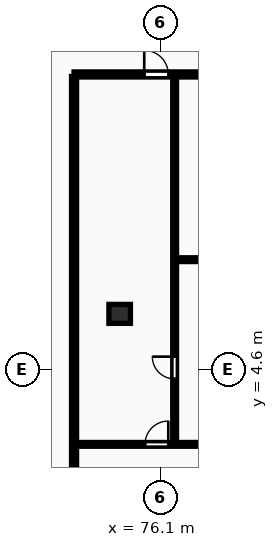
"""IFC4 building model, lengths in metres.
Left out: names, types, materials, properties, quantities, classifications, styles, units other than length and angle.
Written with IfcOpenShell. Run it as: python <this file> out.ifc"""

import sys

from ifc_helpers import new_model, si_unit, direction, frame, frame_2d, origin, origin_2d, place, context, subcontext, project, spatial, rectangle, extrude, element, fill, save


model = new_model("IFC4")
c1 = context("Model", 3, precision=1e-05, world=origin(), true_north=direction((0.0, 1.0)))
c2 = subcontext(c1, "Body", "Model", "MODEL_VIEW")
j1 = project(units=[si_unit("LENGTHUNIT", "METRE"), si_unit("PLANEANGLEUNIT", "RADIAN")], contexts=[c1])
p1 = place(None, origin())
s1 = spatial("IfcSite", under=j1, at=p1, CompositionType="ELEMENT")
p2 = place(p1, origin())
s2 = spatial("IfcBuilding", under=s1, at=p2, CompositionType="ELEMENT")
p3 = place(p2, frame((0.0, 0.0, 80.8)))
s3 = spatial("IfcBuildingStorey", under=s2, at=p3, CompositionType="ELEMENT", Elevation=80.8)
p4 = place(p3, frame((74.5, 6.8, 0.0), z_axis=(0.0, 0.0, 1.0), x_axis=(1.0, 0.0, 0.0)))
e1 = element("IfcColumn", 1, at=p4, inside=s3, PredefinedType="COLUMN", context=c2, shape_type="SweptSolid", body=[
    extrude(rectangle(XDim=0.85, YDim=0.75, at=origin_2d()), origin(), (0.0, 0.0, 1.0), 3.25),
])
p5 = place(p3, frame((72.7, -8.7, 0.0), z_axis=(0.0, 0.0, 1.0), x_axis=(0.0, 1.0, 0.0)))
e2 = element("IfcWall", 2, at=p5, inside=s3, PredefinedType="PARTITIONING", context=c2, shape_type="SweptSolid", body=[
    extrude(rectangle(XDim=24.87, YDim=0.2, at=frame_2d((12.435, 0.0))), origin(), (0.0, 0.0, 1.0), 2.97),
])
p6 = place(p3, frame((76.73, 8.94, 0.0), z_axis=(0.0, 0.0, 1.0), x_axis=(1.0, 0.0, 0.0)))
e3 = element("IfcWall", 3, at=p6, inside=s3, PredefinedType="PARTITIONING", context=c2, shape_type="SweptSolid", body=[
    extrude(rectangle(XDim=9.29, YDim=0.15, at=frame_2d((4.645, 0.0))), origin(), (0.0, 0.0, 1.0), 2.97),
])
p7 = place(p6, frame((2.854, 0.0, 0.0)))
e4 = element("IfcOpeningElement", 4, at=p7, cuts=e3, PredefinedType="OPENING", context=c2, shape_type="SweptSolid", body=[
    extrude(rectangle(XDim=0.88, YDim=2.06, at=frame_2d((0.44, 1.03))), frame((0.0, 0.085, 0.0), z_axis=(0.0, -1.0, 0.0), x_axis=(1.0, 0.0, 0.0)), (0.0, 0.0, 1.0), 0.17),
])
p8 = place(p3, frame((76.67, 1.69, 0.0), z_axis=(0.0, 0.0, 1.0), x_axis=(0.0, 1.0, 0.0)))
e5 = element("IfcWall", 5, at=p8, inside=s3, PredefinedType="PARTITIONING", context=c2, shape_type="SweptSolid", body=[
    extrude(rectangle(XDim=14.5, YDim=0.15, at=frame_2d((7.25, 0.0))), origin(), (0.0, 0.0, 1.0), 2.97),
])
p9 = place(p8, frame((2.542, 0.0, 0.0)))
e6 = element("IfcOpeningElement", 6, at=p9, cuts=e5, PredefinedType="OPENING", context=c2, shape_type="SweptSolid", body=[
    extrude(rectangle(XDim=0.88, YDim=2.06, at=frame_2d((0.44, 1.03))), frame((0.0, 0.085, 0.0), z_axis=(0.0, -1.0, 0.0), x_axis=(1.0, 0.0, 0.0)), (0.0, 0.0, 1.0), 0.17),
])
p10 = place(p3, frame((72.78, 1.65, 0.0), z_axis=(0.0, 0.0, 1.0), x_axis=(1.0, 0.0, 0.0)))
e7 = element("IfcWall", 7, at=p10, inside=s3, PredefinedType="PARTITIONING", context=c2, shape_type="SweptSolid", body=[
    extrude(rectangle(XDim=13.24, YDim=0.15, at=frame_2d((6.62, 0.0))), origin(), (0.0, 0.0, 1.0), 2.97),
])
p11 = place(p10, frame((2.72, 0.0, 0.0)))
e8 = element("IfcOpeningElement", 8, at=p11, cuts=e7, PredefinedType="OPENING", context=c2, shape_type="SweptSolid", body=[
    extrude(rectangle(XDim=0.92, YDim=2.08, at=frame_2d((0.46, 1.04))), frame((0.0, 0.085, 0.0), z_axis=(0.0, -1.0, 0.0), x_axis=(1.0, 0.0, 0.0)), (0.0, 0.0, 1.0), 0.17),
])
p12 = place(p3, frame((72.7, 16.25, 0.0), z_axis=(0.0, 0.0, 1.0), x_axis=(1.0, 0.0, 0.0)))
e9 = element("IfcWall", 9, at=p12, inside=s3, PredefinedType="PARTITIONING", context=c2, shape_type="SweptSolid", body=[
    extrude(rectangle(XDim=58.0, YDim=0.2, at=frame_2d((29.0, 0.0))), origin(), (0.0, 0.0, 1.0), 2.97),
])
p13 = place(p12, frame((2.77, 0.0, 0.0)))
e10 = element("IfcOpeningElement", 10, at=p13, cuts=e9, PredefinedType="OPENING", context=c2, shape_type="SweptSolid", body=[
    extrude(rectangle(XDim=0.95, YDim=2.15, at=frame_2d((0.475, 1.075))), frame((0.0, 0.11, 0.0), z_axis=(0.0, -1.0, 0.0), x_axis=(1.0, 0.0, 0.0)), (0.0, 0.0, 1.0), 0.22),
])
p14 = place(p12, frame((15.445, 0.0, 0.0)))
e11 = element("IfcOpeningElement", 11, at=p14, cuts=e9, PredefinedType="OPENING", context=c2, shape_type="SweptSolid", body=[
    extrude(rectangle(XDim=0.95, YDim=2.15, at=frame_2d((0.475, 1.075))), frame((0.0, 0.11, 0.0), z_axis=(0.0, -1.0, 0.0), x_axis=(1.0, 0.0, 0.0)), (0.0, 0.0, 1.0), 0.22),
])
p15 = place(p12, frame((33.245, 0.0, 0.0)))
e12 = element("IfcOpeningElement", 12, at=p15, cuts=e9, PredefinedType="OPENING", context=c2, shape_type="SweptSolid", body=[
    extrude(rectangle(XDim=0.95, YDim=2.15, at=frame_2d((0.475, 1.075))), frame((0.0, 0.11, 0.0), z_axis=(0.0, -1.0, 0.0), x_axis=(1.0, 0.0, 0.0)), (0.0, 0.0, 1.0), 0.22),
])
p16 = place(p12, frame((47.645, 0.0, 0.0)))
e13 = element("IfcOpeningElement", 13, at=p16, cuts=e9, PredefinedType="OPENING", context=c2, shape_type="SweptSolid", body=[
    extrude(rectangle(XDim=0.95, YDim=2.15, at=frame_2d((0.475, 1.075))), frame((0.0, 0.11, 0.0), z_axis=(0.0, -1.0, 0.0), x_axis=(1.0, 0.0, 0.0)), (0.0, 0.0, 1.0), 0.22),
])
p17 = place(p9, origin())
e14 = element("IfcDoor", 14, at=p17, inside=s3, OperationType="SINGLE_SWING_RIGHT", PredefinedType="DOOR", context=c2, shape_type="SweptSolid", body=[
    extrude(rectangle(XDim=0.88, YDim=2.06, at=frame_2d((0.44, 1.03))), frame((0.0, 0.025, 0.0), z_axis=(0.0, -1.0, 0.0), x_axis=(1.0, 0.0, 0.0)), (0.0, 0.0, 1.0), 0.05),
])
fill(e6, e14)
p18 = place(p11, origin())
e15 = element("IfcDoor", 15, at=p18, inside=s3, OperationType="SINGLE_SWING_RIGHT", PredefinedType="DOOR", context=c2, shape_type="SweptSolid", body=[
    extrude(rectangle(XDim=0.92, YDim=2.08, at=frame_2d((0.46, 1.04))), frame((0.0, 0.025, 0.0), z_axis=(0.0, -1.0, 0.0), x_axis=(1.0, 0.0, 0.0)), (0.0, 0.0, 1.0), 0.05),
])
fill(e8, e15)
p19 = place(p13, origin())
e16 = element("IfcDoor", 16, at=p19, inside=s3, OperationType="SINGLE_SWING_LEFT", PredefinedType="DOOR", context=c2, shape_type="SweptSolid", body=[
    extrude(rectangle(XDim=0.95, YDim=2.15, at=frame_2d((0.475, 1.075))), frame((0.0, 0.025, 0.0), z_axis=(0.0, -1.0, 0.0), x_axis=(1.0, 0.0, 0.0)), (0.0, 0.0, 1.0), 0.05),
])
fill(e10, e16)
save(model, sys.argv[1])
